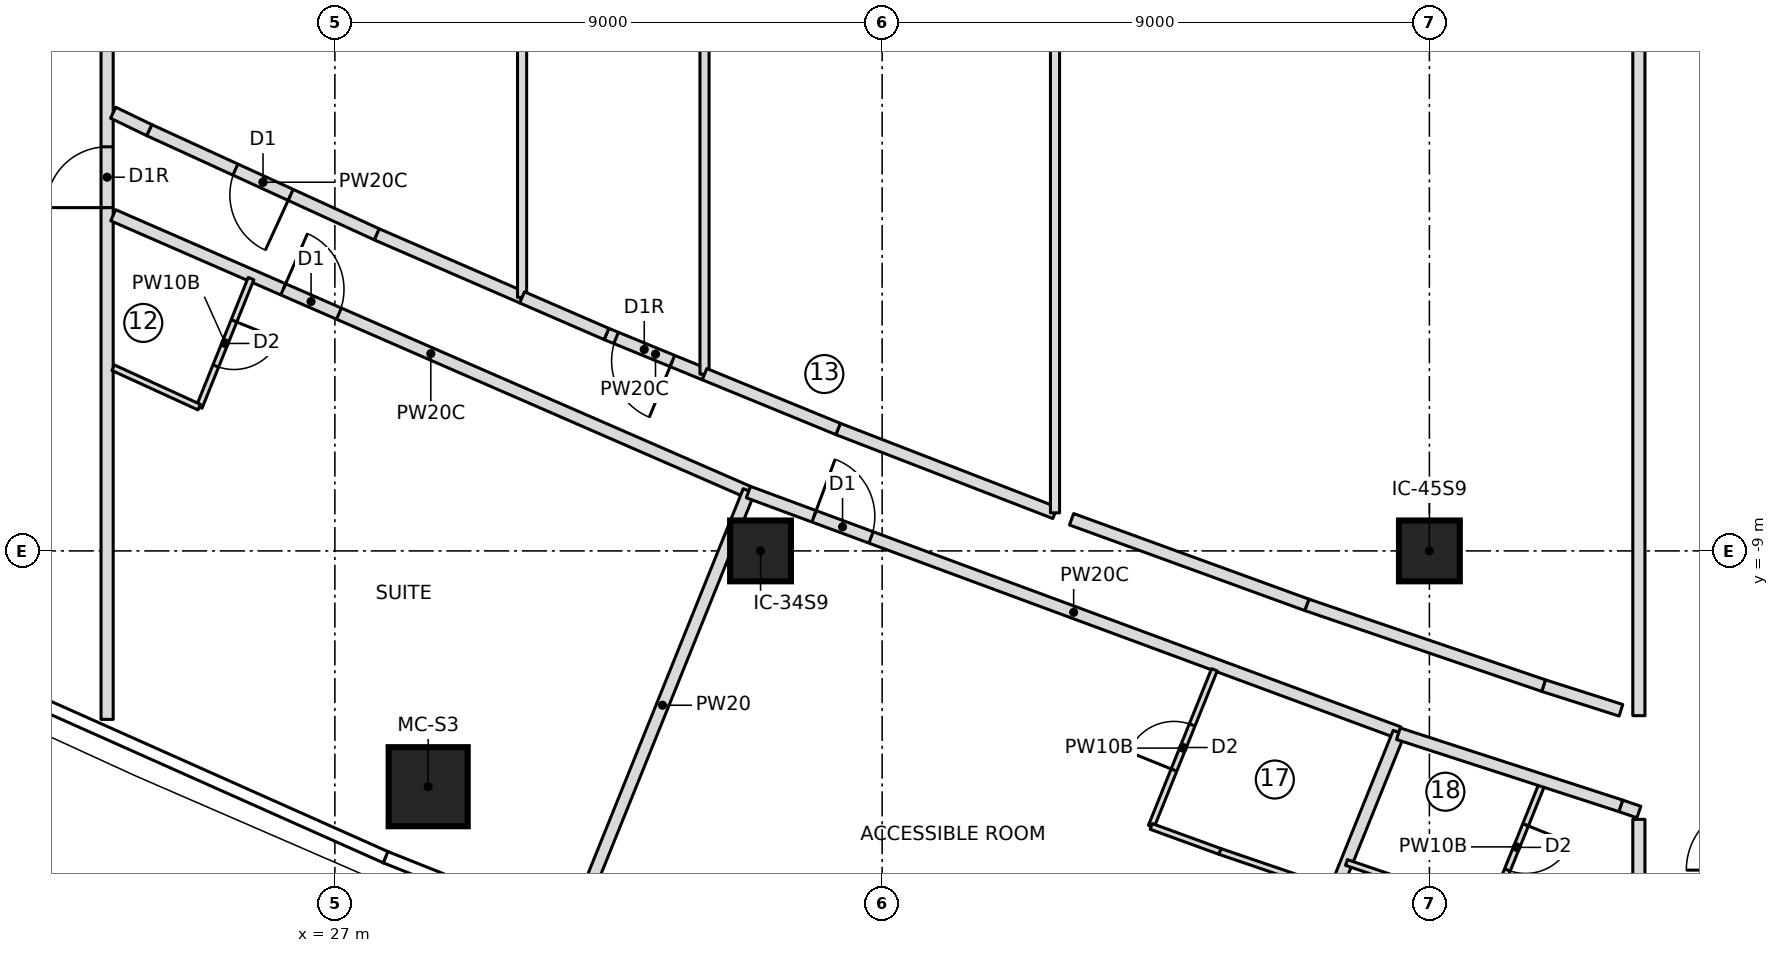
"""IFC4 building model, lengths in metres.
Left out: names, types, materials, properties, quantities, classifications, styles, units other than length and angle.
Written with IfcOpenShell. Run it as: python <this file> out.ifc"""

import sys

from ifc_helpers import new_model, si_unit, direction, frame, frame_2d, origin, origin_2d, place, context, subcontext, project, spatial, rectangle, extrude, element, fill, save


model = new_model("IFC4")
c1 = context("Model", 3, precision=1e-05, world=origin(), true_north=direction((0.0, 1.0)))
c2 = subcontext(c1, "Body", "Model", "MODEL_VIEW")
j1 = project(units=[si_unit("LENGTHUNIT", "METRE"), si_unit("PLANEANGLEUNIT", "RADIAN")], contexts=[c1])
p1 = place(None, origin())
s1 = spatial("IfcSite", under=j1, at=p1, CompositionType="ELEMENT")
p2 = place(p1, origin())
s2 = spatial("IfcBuilding", under=s1, at=p2, CompositionType="ELEMENT")
p3 = place(p2, frame((0.0, 0.0, 186.15)))
s3 = spatial("IfcBuildingStorey", under=s2, at=p3, CompositionType="ELEMENT", Elevation=186.15)
p4 = place(p3, frame((28.534, -12.878, 0.0), z_axis=(0.0, 0.0, 1.0), x_axis=(1.0, 0.0, 0.0)))
e1 = element("IfcColumn", 1, at=p4, inside=s3, PredefinedType="COLUMN", context=c2, shape_type="SweptSolid", body=[
    extrude(rectangle(XDim=1.3, YDim=1.3, at=origin_2d()), origin(), (0.0, 0.0, 1.0), 3.55),
])
for number, where, z_axis, x_axis in (
    (2, (34.0, -9.0, 0.0), (0.0, 0.0, 1.0), (1.0, 0.0, 0.0)),
    (3, (45.0, -9.0, 0.0), (0.0, 0.0, 1.0), (1.0, 0.0, 0.0)),
):
    element("IfcColumn", number, at=place(p3, frame(where, z_axis=z_axis, x_axis=x_axis)), inside=s3, PredefinedType="COLUMN", context=c2, shape_type="SweptSolid", body=[
        extrude(rectangle(XDim=1.0, YDim=1.0, at=origin_2d()), origin(), (0.0, 0.0, 1.0), 3.55),
    ])
p5 = place(p3, frame((23.254, -11.771, 0.0), z_axis=(0.0, 0.0, 1.0), x_axis=(0.0, 1.0, 0.0)))
e4 = element("IfcWall", 4, at=p5, inside=s3, PredefinedType="PARTITIONING", context=c2, shape_type="SweptSolid", body=[
    extrude(rectangle(XDim=23.542, YDim=0.2, at=frame_2d((11.771, 0.0))), origin(), (0.0, 0.0, 1.0), 3.25),
])
p6 = place(p5, frame((14.125, 0.0, 0.0)))
e5 = element("IfcOpeningElement", 5, at=p6, cuts=e4, PredefinedType="OPENING", context=c2, shape_type="SweptSolid", body=[
    extrude(rectangle(XDim=1.0, YDim=2.1, at=frame_2d((0.5, 1.05))), frame((0.0, 0.11, 0.0), z_axis=(0.0, -1.0, 0.0), x_axis=(1.0, 0.0, 0.0)), (0.0, 0.0, 1.0), 0.22),
])
p7 = place(p5, frame((8.417, 0.0, 0.0)))
e6 = element("IfcOpeningElement", 6, at=p7, cuts=e4, PredefinedType="OPENING", context=c2, shape_type="SweptSolid", body=[
    extrude(rectangle(XDim=1.0, YDim=2.1, at=frame_2d((0.5, 1.05))), frame((0.0, 0.11, 0.0), z_axis=(0.0, -1.0, 0.0), x_axis=(1.0, 0.0, 0.0)), (0.0, 0.0, 1.0), 0.22),
])
p8 = place(p3, frame((23.354, -3.479, 0.0), z_axis=(0.0, 0.0, 1.0), x_axis=(0.916726746983, -0.399514794926, 0.0)))
e7 = element("IfcWall", 7, at=p8, inside=s3, PredefinedType="PARTITIONING", context=c2, shape_type="SweptSolid", body=[
    extrude(rectangle(XDim=11.396, YDim=0.2, at=frame_2d((5.698, 0.0))), origin(), (0.0, 0.0, 1.0), 3.25),
])
p9 = place(p8, frame((3.05, 0.0, 0.0)))
e8 = element("IfcOpeningElement", 8, at=p9, cuts=e7, PredefinedType="OPENING", context=c2, shape_type="SweptSolid", body=[
    extrude(rectangle(XDim=1.0, YDim=2.1, at=frame_2d((0.5, 1.05))), frame((0.0, 0.11, 0.0), z_axis=(0.0, -1.0, 0.0), x_axis=(1.0, 0.0, 0.0)), (0.0, 0.0, 1.0), 0.22),
])
p10 = place(p3, frame((25.621, -4.521, 0.0), z_axis=(0.0, 0.0, 1.0), x_axis=(-0.373956446544, -0.927446265877, 0.0)))
e9 = element("IfcWall", 9, at=p10, inside=s3, PredefinedType="PARTITIONING", context=c2, shape_type="SweptSolid", body=[
    extrude(rectangle(XDim=2.279, YDim=0.1, at=frame_2d((1.14, 0.0))), origin(), (0.0, 0.0, 1.0), 3.25),
])
p11 = place(p10, frame((0.75, 0.0, 0.0)))
e10 = element("IfcOpeningElement", 10, at=p11, cuts=e9, PredefinedType="OPENING", context=c2, shape_type="SweptSolid", body=[
    extrude(rectangle(XDim=0.8, YDim=2.1, at=frame_2d((0.4, 1.05))), frame((0.0, 0.06, 0.0), z_axis=(0.0, -1.0, 0.0), x_axis=(1.0, 0.0, 0.0)), (0.0, 0.0, 1.0), 0.12),
])
p12 = place(p3, frame((24.769, -6.635, 0.0), z_axis=(0.0, 0.0, 1.0), x_axis=(-0.909158902999, 0.416449383597, 0.0)))
e11 = element("IfcWall", 11, at=p12, inside=s3, PredefinedType="PARTITIONING", context=c2, shape_type="SweptSolid", body=[
    extrude(rectangle(XDim=1.556, YDim=0.1, at=frame_2d((0.778, 0.0))), origin(), (0.0, 0.0, 1.0), 3.25),
])
p13 = place(p3, frame((30.967, -15.063, 0.0), z_axis=(0.0, 0.0, 1.0), x_axis=(0.373887223455, 0.927474174378, 0.0)))
e12 = element("IfcWall", 12, at=p13, inside=s3, PredefinedType="PARTITIONING", context=c2, shape_type="SweptSolid", body=[
    extrude(rectangle(XDim=7.6, YDim=0.2, at=frame_2d((3.8, 0.0))), origin(), (0.0, 0.0, 1.0), 3.25),
])
p14 = place(p3, frame((33.801, -8.032, 0.0), z_axis=(0.0, 0.0, 1.0), x_axis=(0.937916242759, -0.346861819127, 0.0)))
e13 = element("IfcWall", 13, at=p14, inside=s3, PredefinedType="PARTITIONING", context=c2, shape_type="SweptSolid", body=[
    extrude(rectangle(XDim=11.405, YDim=0.2, at=frame_2d((5.702, 0.0))), origin(), (0.0, 0.0, 1.0), 3.25),
])
p15 = place(p14, frame((1.15, 0.0, 0.0)))
e14 = element("IfcOpeningElement", 14, at=p15, cuts=e13, PredefinedType="OPENING", context=c2, shape_type="SweptSolid", body=[
    extrude(rectangle(XDim=1.0, YDim=2.1, at=frame_2d((0.5, 1.05))), frame((0.0, 0.11, 0.0), z_axis=(0.0, -1.0, 0.0), x_axis=(1.0, 0.0, 0.0)), (0.0, 0.0, 1.0), 0.22),
])
p16 = place(p3, frame((40.426, -13.532, 0.0), z_axis=(0.0, 0.0, 1.0), x_axis=(0.373889095325, 0.927473419779, 0.0)))
e15 = element("IfcWall", 15, at=p16, inside=s3, PredefinedType="PARTITIONING", context=c2, shape_type="SweptSolid", body=[
    extrude(rectangle(XDim=2.778, YDim=0.1, at=frame_2d((1.389, 0.0))), origin(), (0.0, 0.0, 1.0), 3.25),
])
p17 = place(p16, frame((1.0, 0.0, 0.0)))
e16 = element("IfcOpeningElement", 16, at=p17, cuts=e15, PredefinedType="OPENING", context=c2, shape_type="SweptSolid", body=[
    extrude(rectangle(XDim=0.8, YDim=2.1, at=frame_2d((0.4, 1.05))), frame((0.0, 0.06, 0.0), z_axis=(0.0, -1.0, 0.0), x_axis=(1.0, 0.0, 0.0)), (0.0, 0.0, 1.0), 0.12),
])
p18 = place(p3, frame((43.449, -14.589, 0.0), z_axis=(0.0, 0.0, 1.0), x_axis=(-0.94641533286, 0.322952036265, 0.0)))
e17 = element("IfcWall", 17, at=p18, inside=s3, PredefinedType="PARTITIONING", context=c2, shape_type="SweptSolid", body=[
    extrude(rectangle(XDim=2.002, YDim=0.1, at=frame_2d((1.001, 0.0))), origin(), (0.0, 0.0, 1.0), 3.25),
])
p19 = place(p3, frame((41.555, -13.943, 0.0), z_axis=(0.0, 0.0, 1.0), x_axis=(-0.939781557461, 0.341775692897, 0.0)))
e18 = element("IfcWall", 18, at=p19, inside=s3, PredefinedType="PARTITIONING", context=c2, shape_type="SweptSolid", body=[
    extrude(rectangle(XDim=1.201, YDim=0.1, at=frame_2d((0.601, 0.0))), origin(), (0.0, 0.0, 1.0), 3.25),
])
p20 = place(p3, frame((41.652, -19.048, 0.0), z_axis=(0.0, 0.0, 1.0), x_axis=(0.373877998371, 0.927477893178, 0.0)))
e19 = element("IfcWall", 19, at=p20, inside=s3, PredefinedType="PARTITIONING", context=c2, shape_type="SweptSolid", body=[
    extrude(rectangle(XDim=7.611, YDim=0.2, at=frame_2d((3.806, 0.0))), origin(), (0.0, 0.0, 1.0), 3.25),
])
p21 = place(p3, frame((46.863, -12.809, 0.0), z_axis=(0.0, 0.0, 1.0), x_axis=(-0.373877855241, -0.927477950876, 0.0)))
e20 = element("IfcWall", 20, at=p21, inside=s3, PredefinedType="PARTITIONING", context=c2, shape_type="SweptSolid", body=[
    extrude(rectangle(XDim=2.283, YDim=0.1, at=frame_2d((1.142, 0.0))), origin(), (0.0, 0.0, 1.0), 3.25),
])
p22 = place(p21, frame((0.75, 0.0, 0.0)))
e21 = element("IfcOpeningElement", 21, at=p22, cuts=e20, PredefinedType="OPENING", context=c2, shape_type="SweptSolid", body=[
    extrude(rectangle(XDim=0.8, YDim=2.1, at=frame_2d((0.4, 1.05))), frame((0.0, 0.06, 0.0), z_axis=(0.0, -1.0, 0.0), x_axis=(1.0, 0.0, 0.0)), (0.0, 0.0, 1.0), 0.12),
])
p23 = place(p3, frame((45.69, -14.825, 0.0), z_axis=(0.0, 0.0, 1.0), x_axis=(-0.946442988685, 0.322870979136, 0.0)))
e22 = element("IfcWall", 22, at=p23, inside=s3, PredefinedType="PARTITIONING", context=c2, shape_type="SweptSolid", body=[
    extrude(rectangle(XDim=2.169, YDim=0.1, at=frame_2d((1.085, 0.0))), origin(), (0.0, 0.0, 1.0), 3.25),
])
p24 = place(p3, frame((27.69, -3.793, 0.0), z_axis=(0.0, 0.0, 1.0), x_axis=(-0.909180834404, 0.416401501382, 0.0)))
e23 = element("IfcWall", 23, at=p24, inside=s3, PredefinedType="PARTITIONING", context=c2, shape_type="SweptSolid", body=[
    extrude(rectangle(XDim=4.117, YDim=0.2, at=frame_2d((2.059, 0.0))), origin(), (0.0, 0.0, 1.0), 3.25),
])
p25 = place(p24, frame((1.559, 0.0, 0.0)))
e24 = element("IfcOpeningElement", 24, at=p25, cuts=e23, PredefinedType="OPENING", context=c2, shape_type="SweptSolid", body=[
    extrude(rectangle(XDim=1.0, YDim=2.1, at=frame_2d((0.5, 1.05))), frame((0.0, 0.11, 0.0), z_axis=(0.0, -1.0, 0.0), x_axis=(1.0, 0.0, 0.0)), (0.0, 0.0, 1.0), 0.22),
])
p26 = place(p3, frame((23.947, -2.079, 0.0), z_axis=(0.0, 0.0, 1.0), x_axis=(-0.900646803965, 0.434551877809, 0.0)))
e25 = element("IfcWall", 25, at=p26, inside=s3, PredefinedType="PARTITIONING", context=c2, shape_type="SweptSolid", body=[
    extrude(rectangle(XDim=0.658, YDim=0.2, at=frame_2d((0.329, 0.0))), origin(), (0.0, 0.0, 1.0), 3.25),
])
p27 = place(p3, frame((30.079, -4.83, 0.0), z_axis=(0.0, 0.0, 1.0), x_axis=(-0.917370846112, 0.398033579869, 0.0)))
e26 = element("IfcWall", 26, at=p27, inside=s3, PredefinedType="PARTITIONING", context=c2, shape_type="SweptSolid", body=[
    extrude(rectangle(XDim=2.604, YDim=0.2, at=frame_2d((1.302, 0.0))), origin(), (0.0, 0.0, 1.0), 3.25),
])
p28 = place(p3, frame((30.079, -4.83, 0.0), z_axis=(0.0, 0.0, 1.0), x_axis=(0.0, 1.0, 0.0)))
e27 = element("IfcWall", 27, at=p28, inside=s3, PredefinedType="PARTITIONING", context=c2, shape_type="SweptSolid", body=[
    extrude(rectangle(XDim=9.66, YDim=0.15, at=frame_2d((4.83, 0.0))), origin(), (0.0, 0.0, 1.0), 3.25),
])
p29 = place(p3, frame((33.079, -6.093, 0.0), z_axis=(0.0, 0.0, 1.0), x_axis=(-0.925234201035, 0.379396459177, 0.0)))
e28 = element("IfcWall", 28, at=p29, inside=s3, PredefinedType="PARTITIONING", context=c2, shape_type="SweptSolid", body=[
    extrude(rectangle(XDim=1.743, YDim=0.2, at=frame_2d((0.871, 0.0))), origin(), (0.0, 0.0, 1.0), 3.25),
])
p30 = place(p29, frame((0.571, 0.0, 0.0)))
e29 = element("IfcOpeningElement", 29, at=p30, cuts=e28, PredefinedType="OPENING", context=c2, shape_type="SweptSolid", body=[
    extrude(rectangle(XDim=1.0, YDim=2.1, at=frame_2d((0.5, 1.05))), frame((0.0, 0.11, 0.0), z_axis=(0.0, -1.0, 0.0), x_axis=(1.0, 0.0, 0.0)), (0.0, 0.0, 1.0), 0.22),
])
p31 = place(p3, frame((31.467, -5.432, 0.0), z_axis=(0.0, 0.0, 1.0), x_axis=(-0.917382817853, 0.398005986774, 0.0)))
e30 = element("IfcWall", 30, at=p31, inside=s3, PredefinedType="PARTITIONING", context=c2, shape_type="SweptSolid", body=[
    extrude(rectangle(XDim=1.513, YDim=0.2, at=frame_2d((0.756, 0.0))), origin(), (0.0, 0.0, 1.0), 3.25),
])
p32 = place(p3, frame((33.079, -6.093, 0.0), z_axis=(0.0, 0.0, 1.0), x_axis=(0.0, 1.0, 0.0)))
e31 = element("IfcWall", 31, at=p32, inside=s3, PredefinedType="PARTITIONING", context=c2, shape_type="SweptSolid", body=[
    extrude(rectangle(XDim=12.187, YDim=0.15, at=frame_2d((6.093, 0.0))), origin(), (0.0, 0.0, 1.0), 3.25),
])
p33 = place(p3, frame((38.843, -8.374, 0.0), z_axis=(0.0, 0.0, 1.0), x_axis=(-0.932681040007, 0.360702200731, 0.0)))
e32 = element("IfcWall", 32, at=p33, inside=s3, PredefinedType="PARTITIONING", context=c2, shape_type="SweptSolid", body=[
    extrude(rectangle(XDim=3.825, YDim=0.2, at=frame_2d((1.913, 0.0))), origin(), (0.0, 0.0, 1.0), 3.25),
])
p34 = place(p3, frame((35.276, -6.994, 0.0), z_axis=(0.0, 0.0, 1.0), x_axis=(-0.925186207522, 0.37951347988, 0.0)))
e33 = element("IfcWall", 33, at=p34, inside=s3, PredefinedType="PARTITIONING", context=c2, shape_type="SweptSolid", body=[
    extrude(rectangle(XDim=2.375, YDim=0.2, at=frame_2d((1.187, 0.0))), origin(), (0.0, 0.0, 1.0), 3.25),
])
p35 = place(p3, frame((38.843, -8.374, 0.0), z_axis=(0.0, 0.0, 1.0), x_axis=(0.0, 1.0, 0.0)))
e34 = element("IfcWall", 34, at=p35, inside=s3, PredefinedType="PARTITIONING", context=c2, shape_type="SweptSolid", body=[
    extrude(rectangle(XDim=16.748, YDim=0.15, at=frame_2d((8.374, 0.0))), origin(), (0.0, 0.0, 1.0), 3.25),
])
for number, where, z_axis, x_axis in (
    (35, (46.881, -11.217, 0.0), (0.0, 0.0, 1.0), (-0.946, 0.323, 0.0)),
    (36, (42.984, -9.887, 0.0), (0.0, 0.0, 1.0), (-0.94, 0.342, 0.0)),
):
    element("IfcWall", number, at=place(p3, frame(where, z_axis=z_axis, x_axis=x_axis)), inside=s3, PredefinedType="PARTITIONING", context=c2, shape_type="SweptSolid", body=[
        extrude(rectangle(XDim=4.117, YDim=0.2, at=frame_2d((2.059, 0.0))), origin(), (0.0, 0.0, 1.0), 3.25),
    ])
p36 = place(p3, frame((44.49, -12.007, 0.0), z_axis=(0.0, 0.0, 1.0), x_axis=(0.951228355446, -0.308487626648, 0.0)))
e37 = element("IfcWall", 37, at=p36, inside=s3, PredefinedType="PARTITIONING", context=c2, shape_type="SweptSolid", body=[
    extrude(rectangle(XDim=3.847, YDim=0.2, at=frame_2d((1.924, 0.0))), origin(), (0.0, 0.0, 1.0), 3.25),
])
p37 = place(p3, frame((48.15, -11.621, 0.0), z_axis=(0.0, 0.0, 1.0), x_axis=(-0.952761948983, 0.303718074157, 0.0)))
e38 = element("IfcWall", 38, at=p37, inside=s3, PredefinedType="PARTITIONING", context=c2, shape_type="SweptSolid", body=[
    extrude(rectangle(XDim=1.332, YDim=0.2, at=frame_2d((0.666, 0.0))), origin(), (0.0, 0.0, 1.0), 3.25),
])
p38 = place(p3, frame((48.445, 11.71, 0.0), z_axis=(0.0, 0.0, 1.0), x_axis=(0.0, -1.0, 0.0)))
e39 = element("IfcWall", 39, at=p38, inside=s3, PredefinedType="PARTITIONING", context=c2, shape_type="SweptSolid", body=[
    extrude(rectangle(XDim=23.42, YDim=0.2, at=frame_2d((11.71, 0.0))), origin(), (0.0, 0.0, 1.0), 3.25),
])
p39 = place(p3, frame((48.15, -13.194, 0.0), z_axis=(0.0, 0.0, 1.0), x_axis=(0.946069343286, -0.323964191994, 0.0)))
e40 = element("IfcWall", 40, at=p39, inside=s3, PredefinedType="PARTITIONING", context=c2, shape_type="SweptSolid", body=[
    extrude(rectangle(XDim=0.312, YDim=0.2, at=frame_2d((0.156, 0.0))), origin(), (0.0, 0.0, 1.0), 3.25),
])
p40 = place(p3, frame((48.445, -13.415, 0.0), z_axis=(0.0, 0.0, 1.0), x_axis=(0.0, -1.0, 0.0)))
e41 = element("IfcWall", 41, at=p40, inside=s3, PredefinedType="PARTITIONING", context=c2, shape_type="SweptSolid", body=[
    extrude(rectangle(XDim=6.936, YDim=0.2, at=frame_2d((3.468, 0.0))), origin(), (0.0, 0.0, 1.0), 3.25),
])
p41 = place(p40, frame((3.05, 0.0, 0.0)))
e42 = element("IfcOpeningElement", 42, at=p41, cuts=e41, PredefinedType="OPENING", context=c2, shape_type="SweptSolid", body=[
    extrude(rectangle(XDim=1.5, YDim=2.1, at=frame_2d((0.75, 1.05))), frame((0.0, 0.11, 0.0), z_axis=(0.0, -1.0, 0.0), x_axis=(1.0, 0.0, 0.0)), (0.0, 0.0, 1.0), 0.22),
])
p42 = place(p7, origin())
e43 = element("IfcDoor", 43, at=p42, inside=s3, OperationType="SINGLE_SWING_RIGHT", PredefinedType="DOOR", context=c2, shape_type="SweptSolid", body=[
    extrude(rectangle(XDim=1.0, YDim=2.1, at=frame_2d((0.5, 1.05))), frame((0.0, 0.025, 0.0), z_axis=(0.0, -1.0, 0.0), x_axis=(1.0, 0.0, 0.0)), (0.0, 0.0, 1.0), 0.05),
])
fill(e6, e43)
p43 = place(p11, origin())
e44 = element("IfcDoor", 44, at=p43, inside=s3, OperationType="SINGLE_SWING_LEFT", PredefinedType="DOOR", context=c2, shape_type="SweptSolid", body=[
    extrude(rectangle(XDim=0.8, YDim=2.1, at=frame_2d((0.4, 1.05))), frame((0.0, 0.025, 0.0), z_axis=(0.0, -1.0, 0.0), x_axis=(1.0, 0.0, 0.0)), (0.0, 0.0, 1.0), 0.05),
])
fill(e10, e44)
p44 = place(p9, origin())
e45 = element("IfcDoor", 45, at=p44, inside=s3, OperationType="SINGLE_SWING_LEFT", PredefinedType="DOOR", context=c2, shape_type="SweptSolid", body=[
    extrude(rectangle(XDim=1.0, YDim=2.1, at=frame_2d((0.5, 1.05))), frame((0.0, 0.025, 0.0), z_axis=(0.0, -1.0, 0.0), x_axis=(1.0, 0.0, 0.0)), (0.0, 0.0, 1.0), 0.05),
])
fill(e8, e45)
p45 = place(p17, origin())
e46 = element("IfcDoor", 46, at=p45, inside=s3, OperationType="SINGLE_SWING_LEFT", PredefinedType="DOOR", context=c2, shape_type="SweptSolid", body=[
    extrude(rectangle(XDim=0.8, YDim=2.1, at=frame_2d((0.4, 1.05))), frame((0.0, 0.025, 0.0), z_axis=(0.0, -1.0, 0.0), x_axis=(1.0, 0.0, 0.0)), (0.0, 0.0, 1.0), 0.05),
])
fill(e16, e46)
p46 = place(p15, origin())
e47 = element("IfcDoor", 47, at=p46, inside=s3, OperationType="SINGLE_SWING_LEFT", PredefinedType="DOOR", context=c2, shape_type="SweptSolid", body=[
    extrude(rectangle(XDim=1.0, YDim=2.1, at=frame_2d((0.5, 1.05))), frame((0.0, 0.025, 0.0), z_axis=(0.0, -1.0, 0.0), x_axis=(1.0, 0.0, 0.0)), (0.0, 0.0, 1.0), 0.05),
])
fill(e14, e47)
p47 = place(p22, origin())
e48 = element("IfcDoor", 48, at=p47, inside=s3, OperationType="SINGLE_SWING_LEFT", PredefinedType="DOOR", context=c2, shape_type="SweptSolid", body=[
    extrude(rectangle(XDim=0.8, YDim=2.1, at=frame_2d((0.4, 1.05))), frame((0.0, 0.025, 0.0), z_axis=(0.0, -1.0, 0.0), x_axis=(1.0, 0.0, 0.0)), (0.0, 0.0, 1.0), 0.05),
])
fill(e21, e48)
p48 = place(p25, origin())
e49 = element("IfcDoor", 49, at=p48, inside=s3, OperationType="SINGLE_SWING_LEFT", PredefinedType="DOOR", context=c2, shape_type="SweptSolid", body=[
    extrude(rectangle(XDim=1.0, YDim=2.1, at=frame_2d((0.5, 1.05))), frame((0.0, 0.025, 0.0), z_axis=(0.0, -1.0, 0.0), x_axis=(1.0, 0.0, 0.0)), (0.0, 0.0, 1.0), 0.05),
])
fill(e24, e49)
p49 = place(p30, origin())
e50 = element("IfcDoor", 50, at=p49, inside=s3, OperationType="SINGLE_SWING_RIGHT", PredefinedType="DOOR", context=c2, shape_type="SweptSolid", body=[
    extrude(rectangle(XDim=1.0, YDim=2.1, at=frame_2d((0.5, 1.05))), frame((0.0, 0.025, 0.0), z_axis=(0.0, -1.0, 0.0), x_axis=(1.0, 0.0, 0.0)), (0.0, 0.0, 1.0), 0.05),
])
fill(e29, e50)
save(model, sys.argv[1])
